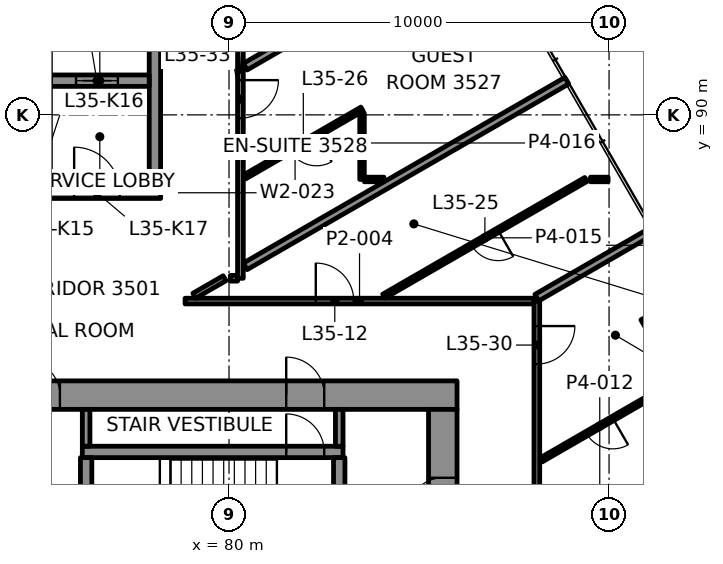
"""IFC4 building model, lengths in metres.
Left out: names, types, materials, properties, quantities, classifications, styles, units other than length and angle.
Written with IfcOpenShell. Run it as: python <this file> out.ifc"""

import sys

from ifc_helpers import new_model, si_unit, direction, frame, frame_2d, origin, origin_2d, place, context, subcontext, project, spatial, rectangle, hollow_rectangle, extrude, element, fill, save


model = new_model("IFC4")
c1 = context("Model", 3, precision=1e-05, world=origin(), true_north=direction((0.0, 1.0)))
c2 = subcontext(c1, "Body", "Model", "MODEL_VIEW")
j1 = project(units=[si_unit("LENGTHUNIT", "METRE"), si_unit("PLANEANGLEUNIT", "RADIAN")], contexts=[c1])
p1 = place(None, origin())
s1 = spatial("IfcSite", under=j1, at=p1, CompositionType="ELEMENT")
p2 = place(p1, origin())
s2 = spatial("IfcBuilding", under=s1, at=p2, CompositionType="ELEMENT")
p3 = place(p2, frame((0.0, 0.0, 155.8)))
s3 = spatial("IfcBuildingStorey", under=s2, at=p3, CompositionType="ELEMENT", Elevation=155.8)
p4 = place(p3, frame((91.47, 84.509, -0.0), z_axis=(0.0, 0.0, 1.0), x_axis=(-0.5, 0.866025403784, 0.0)))
e1 = element("IfcColumn", 1, at=p4, inside=s3, PredefinedType="COLUMN", context=c2, shape_type="SweptSolid", body=[
    extrude(hollow_rectangle(XDim=0.8, YDim=1.0, WallThickness=0.05, at=origin_2d()), origin(), (0.0, 0.0, 1.0), 3.9),
])
p5 = place(p3, frame((64.0, 82.625, 0.0), z_axis=(0.0, 0.0, 1.0), x_axis=(1.0, 0.0, 0.0)))
e2 = element("IfcWall", 2, at=p5, inside=s3, PredefinedType="SHEAR", context=c2, shape_type="SweptSolid", body=[
    extrude(rectangle(XDim=22.0, YDim=0.75, at=frame_2d((11.0, 0.0))), origin(), (0.0, 0.0, 1.0), 3.7),
])
p6 = place(p5, frame((3.695, 0.0, 0.0)))
e3 = element("IfcOpeningElement", 3, at=p6, cuts=e2, PredefinedType="OPENING", context=c2, shape_type="SweptSolid", body=[
    extrude(rectangle(XDim=1.0, YDim=2.1, at=frame_2d((0.5, 1.05))), frame((0.0, 0.385, 0.0), z_axis=(0.0, -1.0, 0.0), x_axis=(1.0, 0.0, 0.0)), (0.0, 0.0, 1.0), 0.77),
])
p7 = place(p5, frame((17.505, 0.0, 0.0)))
e4 = element("IfcOpeningElement", 4, at=p7, cuts=e2, PredefinedType="OPENING", context=c2, shape_type="SweptSolid", body=[
    extrude(rectangle(XDim=1.0, YDim=2.1, at=frame_2d((0.5, 1.05))), frame((0.0, 0.385, 0.0), z_axis=(0.0, -1.0, 0.0), x_axis=(1.0, 0.0, 0.0)), (0.0, 0.0, 1.0), 0.77),
])
p8 = place(p5, frame((10.65, 0.0, 0.0)))
e5 = element("IfcOpeningElement", 5, at=p8, cuts=e2, PredefinedType="OPENING", context=c2, shape_type="SweptSolid", body=[
    extrude(rectangle(XDim=0.9, YDim=2.1, at=frame_2d((0.45, 1.05))), frame((0.0, 0.385, 0.0), z_axis=(0.0, -1.0, 0.0), x_axis=(1.0, 0.0, 0.0)), (0.0, 0.0, 1.0), 0.77),
])
p9 = place(p3, frame((85.625, 67.75, 0.0), z_axis=(0.0, 0.0, 1.0), x_axis=(0.0, 1.0, 0.0)))
e6 = element("IfcWall", 6, at=p9, inside=s3, PredefinedType="SHEAR", context=c2, shape_type="SweptSolid", body=[
    extrude(rectangle(XDim=14.5, YDim=0.75, at=frame_2d((7.25, 0.0))), origin(), (0.0, 0.0, 1.0), 3.7),
])
p10 = place(p9, frame((4.65, 0.0, 0.0)))
e7 = element("IfcOpeningElement", 7, at=p10, cuts=e6, PredefinedType="OPENING", context=c2, shape_type="SweptSolid", body=[
    extrude(rectangle(XDim=1.8, YDim=2.1, at=frame_2d((0.9, 1.05))), frame((0.0, 0.385, 0.0), z_axis=(0.0, -1.0, 0.0), x_axis=(1.0, 0.0, 0.0)), (0.0, 0.0, 1.0), 0.77),
])
p11 = place(p9, frame((11.8, 0.0, 0.0)))
e8 = element("IfcOpeningElement", 8, at=p11, cuts=e6, PredefinedType="OPENING", context=c2, shape_type="SweptSolid", body=[
    extrude(rectangle(XDim=0.9, YDim=2.1, at=frame_2d((0.45, 1.05))), frame((0.0, 0.385, 0.0), z_axis=(0.0, -1.0, 0.0), x_axis=(1.0, 0.0, 0.0)), (0.0, 0.0, 1.0), 0.77),
])
p12 = place(p3, frame((76.14, 81.13, 0.0), z_axis=(0.0, 0.0, 1.0), x_axis=(1.0, 0.0, 0.0)))
e9 = element("IfcWall", 9, at=p12, inside=s3, PredefinedType="SHEAR", context=c2, shape_type="SweptSolid", body=[
    extrude(rectangle(XDim=6.86, YDim=0.3, at=frame_2d((3.43, 0.0))), origin(), (0.0, 0.0, 1.0), 3.7),
])
p13 = place(p12, frame((5.365, 0.0, 0.0)))
e10 = element("IfcOpeningElement", 10, at=p13, cuts=e9, PredefinedType="OPENING", context=c2, shape_type="SweptSolid", body=[
    extrude(rectangle(XDim=1.0, YDim=2.1, at=frame_2d((0.5, 1.05))), frame((0.0, 0.16, 0.0), z_axis=(0.0, -1.0, 0.0), x_axis=(1.0, 0.0, 0.0)), (0.0, 0.0, 1.0), 0.32),
])
for number, where, z_axis, x_axis in (
    (11, (76.24, 77.9, 0.0), (0.0, 0.0, 1.0), (0.0, 1.0, 0.0)),
    (12, (82.9, 77.9, 0.0), (0.0, 0.0, 1.0), (0.0, 1.0, 0.0)),
):
    element("IfcWall", number, at=place(p3, frame(where, z_axis=z_axis, x_axis=x_axis)), inside=s3, PredefinedType="SHEAR", context=c2, shape_type="SweptSolid", body=[
        extrude(rectangle(XDim=3.08, YDim=0.3, at=frame_2d((1.54, 0.0))), origin(), (0.0, 0.0, 1.0), 3.7),
    ])
p14 = place(p3, frame((71.8, 87.95, 0.0), z_axis=(0.0, 0.0, 1.0), x_axis=(1.0, 0.0, 0.0)))
e13 = element("IfcWall", 13, at=p14, inside=s3, PredefinedType="SHEAR", context=c2, shape_type="SweptSolid", body=[
    extrude(rectangle(XDim=6.4, YDim=0.3, at=frame_2d((3.2, 0.0))), origin(), (0.0, 0.0, 1.0), 3.7),
])
p15 = place(p14, frame((1.325, 0.0, 0.0)))
e14 = element("IfcOpeningElement", 14, at=p15, cuts=e13, PredefinedType="OPENING", context=c2, shape_type="SweptSolid", body=[
    extrude(rectangle(XDim=1.0, YDim=2.1, at=frame_2d((0.5, 1.05))), frame((0.0, 0.16, 0.0), z_axis=(0.0, -1.0, 0.0), x_axis=(1.0, 0.0, 0.0)), (0.0, 0.0, 1.0), 0.32),
])
p16 = place(p14, frame((4.125, 0.0, 0.0)))
e15 = element("IfcOpeningElement", 15, at=p16, cuts=e13, PredefinedType="OPENING", context=c2, shape_type="SweptSolid", body=[
    extrude(rectangle(XDim=1.2, YDim=2.1, at=frame_2d((0.6, 1.05))), frame((0.0, 0.16, 0.0), z_axis=(0.0, -1.0, 0.0), x_axis=(1.0, 0.0, 0.0)), (0.0, 0.0, 1.0), 0.32),
])
p17 = place(p3, frame((78.05, 88.1, 0.0), z_axis=(0.0, 0.0, 1.0), x_axis=(0.0, 1.0, 0.0)))
e16 = element("IfcWall", 16, at=p17, inside=s3, PredefinedType="SHEAR", context=c2, shape_type="SweptSolid", body=[
    extrude(rectangle(XDim=6.2, YDim=0.3, at=frame_2d((3.1, 0.0))), origin(), (0.0, 0.0, 1.0), 3.7),
])
p18 = place(p3, frame((75.3, 90.9, 0.0), z_axis=(0.0, 0.0, 1.0), x_axis=(1.0, 0.0, 0.0)))
e17 = element("IfcWall", 17, at=p18, inside=s3, PredefinedType="SHEAR", context=c2, shape_type="SweptSolid", body=[
    extrude(rectangle(XDim=2.6, YDim=0.3, at=frame_2d((1.3, 0.0))), origin(), (0.0, 0.0, 1.0), 3.7),
])
p19 = place(p18, frame((0.675, 0.0, 0.0)))
e18 = element("IfcOpeningElement", 18, at=p19, cuts=e17, PredefinedType="OPENING", context=c2, shape_type="SweptSolid", body=[
    extrude(rectangle(XDim=1.1, YDim=2.1, at=frame_2d((0.55, 1.05))), frame((0.0, 0.16, 0.0), z_axis=(0.0, -1.0, 0.0), x_axis=(1.0, 0.0, 0.0)), (0.0, 0.0, 1.0), 0.32),
])
p20 = place(p3, frame((78.844, 85.1, 0.0), z_axis=(0.0, 0.0, 1.0), x_axis=(1.0, 0.0, 0.0)))
e19 = element("IfcWall", 19, at=p20, inside=s3, PredefinedType="PARTITIONING", context=c2, shape_type="SweptSolid", body=[
    extrude(rectangle(XDim=9.181, YDim=0.15, at=frame_2d((4.59, 0.0))), origin(), (0.0, 0.0, 1.0), 3.1),
])
p21 = place(p20, frame((3.439, 0.0, 0.0)))
e20 = element("IfcOpeningElement", 20, at=p21, cuts=e19, PredefinedType="OPENING", context=c2, shape_type="SweptSolid", body=[
    extrude(rectangle(XDim=1.0, YDim=2.1, at=frame_2d((0.5, 1.05))), frame((0.0, 0.085, 0.0), z_axis=(0.0, -1.0, 0.0), x_axis=(1.0, 0.0, 0.0)), (0.0, 0.0, 1.0), 0.17),
])
p22 = place(p3, frame((80.033, 85.7, 0.0), z_axis=(0.0, 0.0, 1.0), x_axis=(1.0, 0.0, 0.0)))
e21 = element("IfcWall", 21, at=p22, inside=s3, PredefinedType="PARTITIONING", context=c2, shape_type="SweptSolid", body=[
    extrude(rectangle(XDim=0.192, YDim=0.15, at=frame_2d((0.096, 0.0))), origin(), (0.0, 0.0, 1.0), 3.1),
])
p23 = place(p3, frame((83.56, 88.3, 0.0), z_axis=(0.0, 0.0, 1.0), x_axis=(1.0, 0.0, 0.0)))
e22 = element("IfcWall", 22, at=p23, inside=s3, PredefinedType="PARTITIONING", context=c2, shape_type="SweptSolid", body=[
    extrude(rectangle(XDim=0.516, YDim=0.12, at=frame_2d((0.258, 0.0))), origin(), (0.0, 0.0, 1.0), 3.1),
])
p24 = place(p3, frame((89.511, 88.3, 0.0), z_axis=(0.0, 0.0, 1.0), x_axis=(1.0, 0.0, 0.0)))
e23 = element("IfcWall", 23, at=p24, inside=s3, PredefinedType="PARTITIONING", context=c2, shape_type="SweptSolid", body=[
    extrude(rectangle(XDim=0.464, YDim=0.12, at=frame_2d((0.232, 0.0))), origin(), (0.0, 0.0, 1.0), 3.1),
])
p25 = place(p3, frame((88.227, 77.383, 0.0), z_axis=(0.0, 0.0, 1.0), x_axis=(0.866023680911, 0.500002984092, 0.0)))
e24 = element("IfcWall", 24, at=p25, inside=s3, PredefinedType="PARTITIONING", context=c2, shape_type="SweptSolid", body=[
    extrude(rectangle(XDim=7.333, YDim=0.2, at=frame_2d((3.666, 0.0))), origin(), (0.0, 0.0, 1.0), 2.865),
])
p26 = place(p3, frame((91.3, 82.703, 0.0), z_axis=(0.0, 0.0, 1.0), x_axis=(-0.866028357664, -0.499994883695, 0.0)))
e25 = element("IfcWall", 25, at=p26, inside=s3, PredefinedType="PARTITIONING", context=c2, shape_type="SweptSolid", body=[
    extrude(rectangle(XDim=3.568, YDim=0.12, at=frame_2d((1.784, 0.0))), origin(), (0.0, 0.0, 1.0), 3.1),
])
p27 = place(p26, frame((1.384, 0.0, 0.0)))
e26 = element("IfcOpeningElement", 26, at=p27, cuts=e25, PredefinedType="OPENING", context=c2, shape_type="SweptSolid", body=[
    extrude(rectangle(XDim=0.8, YDim=2.1, at=frame_2d((0.4, 1.05))), frame((0.0, 0.07, 0.0), z_axis=(0.0, -1.0, 0.0), x_axis=(1.0, 0.0, 0.0)), (0.0, 0.0, 1.0), 0.14),
])
p28 = place(p3, frame((88.1, 85.19, 0.0), z_axis=(0.0, 0.0, 1.0), x_axis=(0.866039681005, 0.499975270313, 0.0)))
e27 = element("IfcWall", 27, at=p28, inside=s3, PredefinedType="PARTITIONING", context=c2, shape_type="SweptSolid", body=[
    extrude(rectangle(XDim=3.539, YDim=0.2, at=frame_2d((1.77, 0.0))), origin(), (0.0, 0.0, 1.0), 2.865),
])
p29 = place(p3, frame((89.391, 88.3, 0.0), z_axis=(0.0, 0.0, 1.0), x_axis=(-0.866037264291, -0.499979456437, 0.0)))
e28 = element("IfcWall", 28, at=p29, inside=s3, PredefinedType="PARTITIONING", context=c2, shape_type="SweptSolid", body=[
    extrude(rectangle(XDim=6.14, YDim=0.12, at=frame_2d((3.07, 0.0))), origin(), (0.0, 0.0, 1.0), 2.865),
])
p30 = place(p29, frame((2.67, 0.0, 0.0)))
e29 = element("IfcOpeningElement", 29, at=p30, cuts=e28, PredefinedType="OPENING", context=c2, shape_type="SweptSolid", body=[
    extrude(rectangle(XDim=0.8, YDim=2.1, at=frame_2d((0.4, 1.05))), frame((0.0, 0.07, 0.0), z_axis=(0.0, -1.0, 0.0), x_axis=(1.0, 0.0, 0.0)), (0.0, 0.0, 1.0), 0.14),
])
p31 = place(p3, frame((79.086, 85.24, 0.0), z_axis=(0.0, 0.0, 1.0), x_axis=(0.865898279276, 0.500220121494, 0.0)))
e30 = element("IfcWall", 30, at=p31, inside=s3, PredefinedType="PARTITIONING", context=c2, shape_type="SweptSolid", body=[
    extrude(rectangle(XDim=0.92, YDim=0.15, at=frame_2d((0.46, 0.0))), origin(), (0.0, 0.0, 1.0), 3.1),
])
p32 = place(p3, frame((80.427, 86.014, 0.0), z_axis=(0.0, 0.0, 1.0), x_axis=(0.866026648273, 0.499997844476, 0.0)))
e31 = element("IfcWall", 31, at=p32, inside=s3, PredefinedType="PARTITIONING", context=c2, shape_type="SweptSolid", body=[
    extrude(rectangle(XDim=9.771, YDim=0.2, at=frame_2d((4.886, 0.0))), origin(), (0.0, 0.0, 1.0), 2.865),
])
p33 = place(p3, frame((83.5, 90.152, 0.0), z_axis=(0.0, 0.0, 1.0), x_axis=(-0.866028357664, -0.499994883695, 0.0)))
e32 = element("IfcWall", 32, at=p33, inside=s3, PredefinedType="PARTITIONING", context=c2, shape_type="SweptSolid", body=[
    extrude(rectangle(XDim=3.568, YDim=0.12, at=frame_2d((1.784, 0.0))), origin(), (0.0, 0.0, 1.0), 3.1),
])
p34 = place(p33, frame((1.384, 0.0, 0.0)))
e33 = element("IfcOpeningElement", 33, at=p34, cuts=e32, PredefinedType="OPENING", context=c2, shape_type="SweptSolid", body=[
    extrude(rectangle(XDim=0.8, YDim=2.1, at=frame_2d((0.4, 1.05))), frame((0.0, 0.07, 0.0), z_axis=(0.0, -1.0, 0.0), x_axis=(1.0, 0.0, 0.0)), (0.0, 0.0, 1.0), 0.14),
])
p35 = place(p3, frame((80.427, 91.268, 0.0), z_axis=(0.0, 0.0, 1.0), x_axis=(0.866030807744, 0.499990639951, 0.0)))
e34 = element("IfcWall", 34, at=p35, inside=s3, PredefinedType="PARTITIONING", context=c2, shape_type="SweptSolid", body=[
    extrude(rectangle(XDim=7.145, YDim=0.2, at=frame_2d((3.572, 0.0))), origin(), (0.0, 0.0, 1.0), 2.865),
])
p36 = place(p3, frame((88.1, 85.1, 0.0), z_axis=(0.0, 0.0, 1.0), x_axis=(0.0, -1.0, 0.0)))
e35 = element("IfcWall", 35, at=p36, inside=s3, PredefinedType="PARTITIONING", context=c2, shape_type="SweptSolid", body=[
    extrude(rectangle(XDim=16.624, YDim=0.15, at=frame_2d((8.312, 0.0))), origin(), (0.0, 0.0, 1.0), 3.1),
])
p37 = place(p36, frame((0.657, 0.0, 0.0)))
e36 = element("IfcOpeningElement", 36, at=p37, cuts=e35, PredefinedType="OPENING", context=c2, shape_type="SweptSolid", body=[
    extrude(rectangle(XDim=1.0, YDim=2.1, at=frame_2d((0.5, 1.05))), frame((0.0, 0.085, 0.0), z_axis=(0.0, -1.0, 0.0), x_axis=(1.0, 0.0, 0.0)), (0.0, 0.0, 1.0), 0.17),
])
p38 = place(p36, frame((8.071, 0.0, 0.0)))
e37 = element("IfcOpeningElement", 37, at=p38, cuts=e35, PredefinedType="OPENING", context=c2, shape_type="SweptSolid", body=[
    extrude(rectangle(XDim=1.0, YDim=2.1, at=frame_2d((0.5, 1.05))), frame((0.0, 0.085, 0.0), z_axis=(0.0, -1.0, 0.0), x_axis=(1.0, 0.0, 0.0)), (0.0, 0.0, 1.0), 0.17),
])
p39 = place(p36, frame((13.325, 0.0, 0.0)))
e38 = element("IfcOpeningElement", 38, at=p39, cuts=e35, PredefinedType="OPENING", context=c2, shape_type="SweptSolid", body=[
    extrude(rectangle(XDim=1.0, YDim=2.1, at=frame_2d((0.5, 1.05))), frame((0.0, 0.085, 0.0), z_axis=(0.0, -1.0, 0.0), x_axis=(1.0, 0.0, 0.0)), (0.0, 0.0, 1.0), 0.17),
])
p40 = place(p3, frame((83.5, 88.3, 0.0), z_axis=(0.0, 0.0, 1.0), x_axis=(0.0, 1.0, 0.0)))
e39 = element("IfcWall", 39, at=p40, inside=s3, PredefinedType="PARTITIONING", context=c2, shape_type="SweptSolid", body=[
    extrude(rectangle(XDim=1.743, YDim=0.12, at=frame_2d((0.872, 0.0))), origin(), (0.0, 0.0, 1.0), 3.1),
])
p41 = place(p3, frame((80.3, 96.699, 0.0), z_axis=(0.0, 0.0, 1.0), x_axis=(0.0, -1.0, 0.0)))
e40 = element("IfcWall", 40, at=p41, inside=s3, PredefinedType="PARTITIONING", context=c2, shape_type="SweptSolid", body=[
    extrude(rectangle(XDim=11.0, YDim=0.15, at=frame_2d((5.5, 0.0))), origin(), (0.0, 0.0, 1.0), 3.022),
])
p42 = place(p41, frame((5.786, 0.0, 0.0)))
e41 = element("IfcOpeningElement", 41, at=p42, cuts=e40, PredefinedType="OPENING", context=c2, shape_type="SweptSolid", body=[
    extrude(rectangle(XDim=1.0, YDim=2.1, at=frame_2d((0.5, 1.05))), frame((0.0, 0.085, 0.0), z_axis=(0.0, -1.0, 0.0), x_axis=(1.0, 0.0, 0.0)), (0.0, 0.0, 1.0), 0.17),
])
for number, where, z_axis, x_axis in (
    (42, (76.24, 81.28, 0.0), (0.0, 0.0, 1.0), (0.0, 1.0, 0.0)),
    (43, (82.9, 81.28, 0.0), (0.0, 0.0, 1.0), (0.0, 1.0, 0.0)),
):
    element("IfcWall", number, at=place(p3, frame(where, z_axis=z_axis, x_axis=x_axis)), inside=s3, PredefinedType="PARTITIONING", context=c2, shape_type="SweptSolid", body=[
        extrude(rectangle(XDim=0.97, YDim=0.2, at=frame_2d((0.485, 0.0))), origin(), (0.0, 0.0, 1.0), 3.7),
    ])
p43 = place(p21, origin())
e44 = element("IfcDoor", 44, at=p43, inside=s3, OperationType="SINGLE_SWING_RIGHT", PredefinedType="DOOR", context=c2, shape_type="SweptSolid", body=[
    extrude(rectangle(XDim=1.0, YDim=2.1, at=frame_2d((0.5, 1.05))), frame((0.0, 0.025, 0.0), z_axis=(0.0, -1.0, 0.0), x_axis=(1.0, 0.0, 0.0)), (0.0, 0.0, 1.0), 0.05),
])
fill(e20, e44)
p44 = place(p27, origin())
e45 = element("IfcDoor", 45, at=p44, inside=s3, OperationType="SINGLE_SWING_RIGHT", PredefinedType="DOOR", context=c2, shape_type="SweptSolid", body=[
    extrude(rectangle(XDim=0.8, YDim=2.1, at=frame_2d((0.4, 1.05))), frame((0.0, 0.025, 0.0), z_axis=(0.0, -1.0, 0.0), x_axis=(1.0, 0.0, 0.0)), (0.0, 0.0, 1.0), 0.05),
])
fill(e26, e45)
p45 = place(p30, origin())
e46 = element("IfcDoor", 46, at=p45, inside=s3, OperationType="SINGLE_SWING_RIGHT", PredefinedType="DOOR", context=c2, shape_type="SweptSolid", body=[
    extrude(rectangle(XDim=0.8, YDim=2.1, at=frame_2d((0.4, 1.05))), frame((0.0, 0.025, 0.0), z_axis=(0.0, -1.0, 0.0), x_axis=(1.0, 0.0, 0.0)), (0.0, 0.0, 1.0), 0.05),
])
fill(e29, e46)
p46 = place(p34, origin())
e47 = element("IfcDoor", 47, at=p46, inside=s3, OperationType="SINGLE_SWING_RIGHT", PredefinedType="DOOR", context=c2, shape_type="SweptSolid", body=[
    extrude(rectangle(XDim=0.8, YDim=2.1, at=frame_2d((0.4, 1.05))), frame((0.0, 0.025, 0.0), z_axis=(0.0, -1.0, 0.0), x_axis=(1.0, 0.0, 0.0)), (0.0, 0.0, 1.0), 0.05),
])
fill(e33, e47)
p47 = place(p37, origin())
e48 = element("IfcDoor", 48, at=p47, inside=s3, OperationType="SINGLE_SWING_LEFT", PredefinedType="DOOR", context=c2, shape_type="SweptSolid", body=[
    extrude(rectangle(XDim=1.0, YDim=2.1, at=frame_2d((0.5, 1.05))), frame((0.0, 0.025, 0.0), z_axis=(0.0, -1.0, 0.0), x_axis=(1.0, 0.0, 0.0)), (0.0, 0.0, 1.0), 0.05),
])
fill(e36, e48)
p48 = place(p42, origin())
e49 = element("IfcDoor", 49, at=p48, inside=s3, OperationType="SINGLE_SWING_LEFT", PredefinedType="DOOR", context=c2, shape_type="SweptSolid", body=[
    extrude(rectangle(XDim=1.0, YDim=2.1, at=frame_2d((0.5, 1.05))), frame((0.0, 0.025, 0.0), z_axis=(0.0, -1.0, 0.0), x_axis=(1.0, 0.0, 0.0)), (0.0, 0.0, 1.0), 0.05),
])
fill(e41, e49)
p49 = place(p19, origin())
e50 = element("IfcDoor", 50, at=p49, inside=s3, OperationType="DOUBLE_DOOR_SLIDING", PredefinedType="DOOR", context=c2, shape_type="SweptSolid", body=[
    extrude(rectangle(XDim=1.1, YDim=2.1, at=frame_2d((0.55, 1.05))), frame((0.0, 0.025, 0.0), z_axis=(0.0, -1.0, 0.0), x_axis=(1.0, 0.0, 0.0)), (0.0, 0.0, 1.0), 0.05),
])
fill(e18, e50)
p50 = place(p13, origin())
e51 = element("IfcDoor", 51, at=p50, inside=s3, OperationType="SINGLE_SWING_RIGHT", PredefinedType="DOOR", context=c2, shape_type="SweptSolid", body=[
    extrude(rectangle(XDim=1.0, YDim=2.1, at=frame_2d((0.5, 1.05))), frame((0.0, 0.025, 0.0), z_axis=(0.0, -1.0, 0.0), x_axis=(1.0, 0.0, 0.0)), (0.0, 0.0, 1.0), 0.05),
])
fill(e10, e51)
p51 = place(p7, origin())
e52 = element("IfcDoor", 52, at=p51, inside=s3, OperationType="SINGLE_SWING_LEFT", PredefinedType="DOOR", context=c2, shape_type="SweptSolid", body=[
    extrude(rectangle(XDim=1.0, YDim=2.1, at=frame_2d((0.5, 1.05))), frame((0.0, 0.095, 0.0), z_axis=(0.0, -1.0, 0.0), x_axis=(1.0, 0.0, 0.0)), (0.0, 0.0, 1.0), 0.19),
])
fill(e4, e52)
p52 = place(p16, origin())
e53 = element("IfcDoor", 53, at=p52, inside=s3, OperationType="SINGLE_SWING_RIGHT", PredefinedType="DOOR", context=c2, shape_type="SweptSolid", body=[
    extrude(rectangle(XDim=1.2, YDim=2.1, at=frame_2d((0.6, 1.05))), frame((0.0, 0.025, 0.0), z_axis=(0.0, -1.0, 0.0), x_axis=(1.0, 0.0, 0.0)), (0.0, 0.0, 1.0), 0.05),
])
fill(e15, e53)
p53 = place(p8, origin())
e54 = element("IfcDoor", 54, at=p53, inside=s3, OperationType="SINGLE_SWING_RIGHT", PredefinedType="DOOR", context=c2, shape_type="SweptSolid", body=[
    extrude(rectangle(XDim=0.9, YDim=2.1, at=frame_2d((0.45, 1.05))), frame((0.0, 0.095, 0.0), z_axis=(0.0, -1.0, 0.0), x_axis=(1.0, 0.0, 0.0)), (0.0, 0.0, 1.0), 0.19),
])
fill(e5, e54)
p54 = place(p11, origin())
e55 = element("IfcDoor", 55, at=p54, inside=s3, OperationType="SINGLE_SWING_LEFT", PredefinedType="DOOR", context=c2, shape_type="SweptSolid", body=[
    extrude(rectangle(XDim=0.9, YDim=2.1, at=frame_2d((0.45, 1.05))), frame((0.0, 0.095, 0.0), z_axis=(0.0, -1.0, 0.0), x_axis=(1.0, 0.0, 0.0)), (0.0, 0.0, 1.0), 0.19),
])
fill(e8, e55)
save(model, sys.argv[1])
